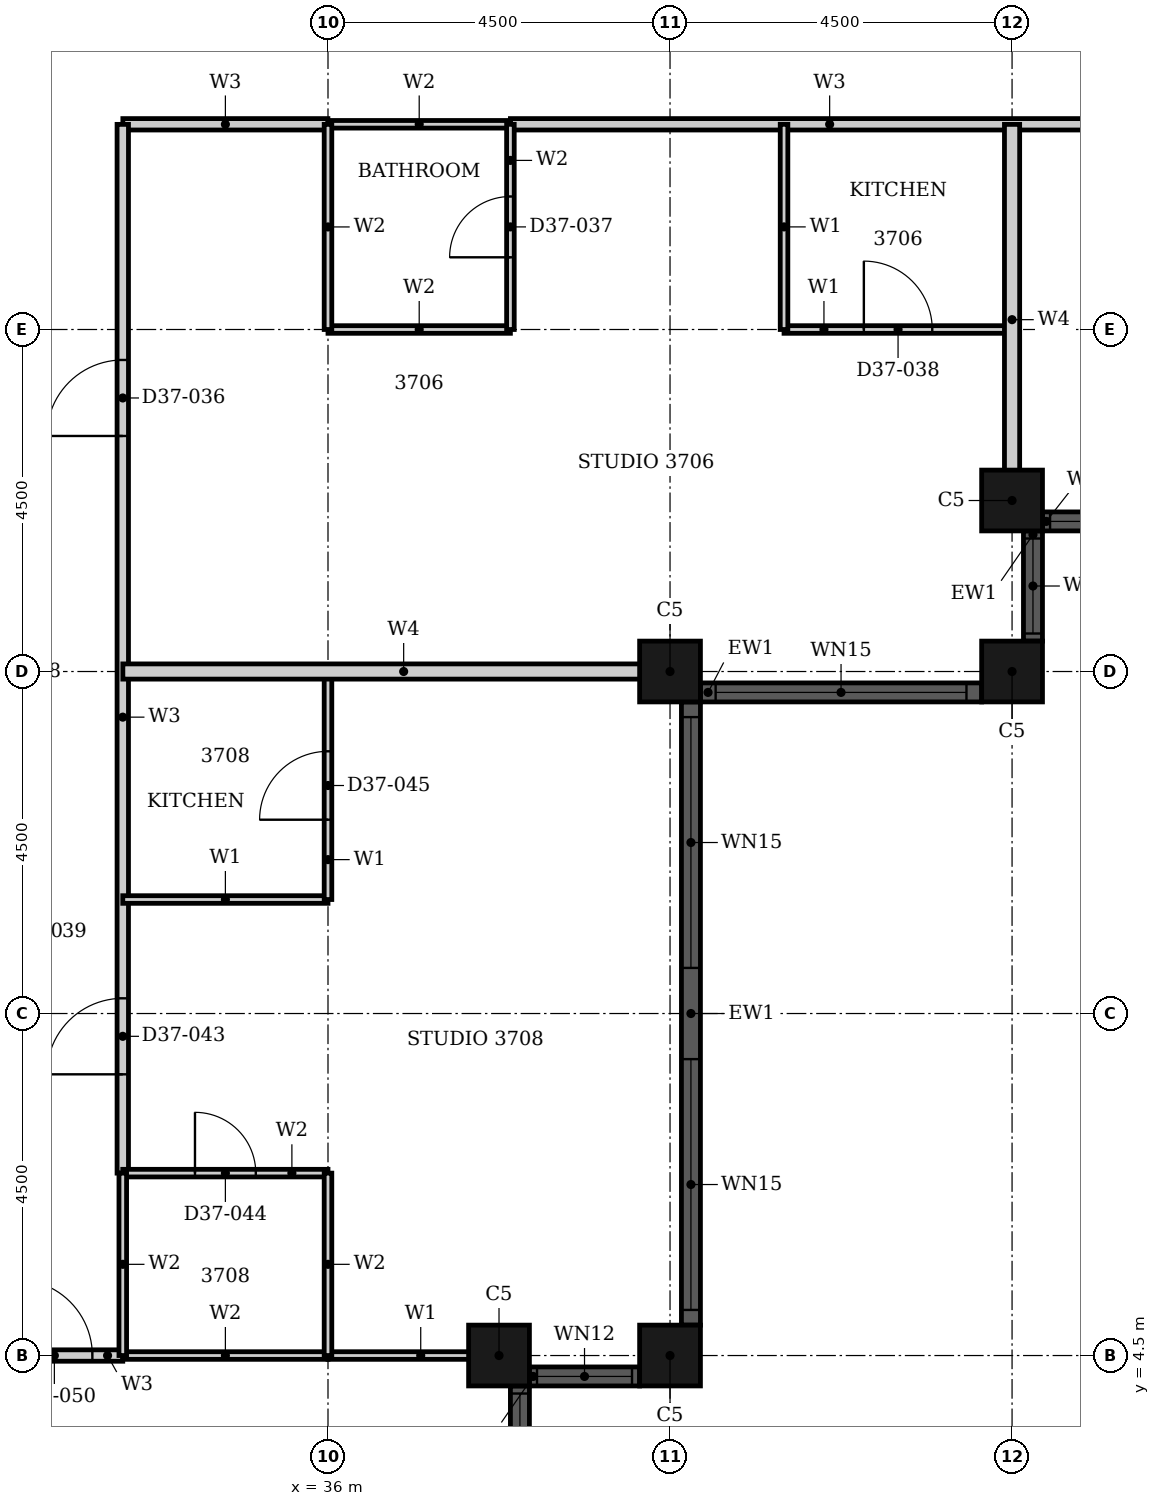
"""IFC4 building model, lengths in metres.
Left out: names, types, materials, properties, quantities, classifications, styles, units other than length and angle.
Written with IfcOpenShell. Run it as: python <this file> out.ifc"""

import sys

from ifc_helpers import new_model, si_unit, direction, frame, frame_2d, origin, origin_2d, place, context, subcontext, project, spatial, rectangle, hollow_rectangle, extrude, element, fill, save


model = new_model("IFC4")
c1 = context("Model", 3, precision=1e-05, world=origin(), true_north=direction((0.0, 1.0)))
c2 = subcontext(c1, "Body", "Model", "MODEL_VIEW")
j1 = project(units=[si_unit("LENGTHUNIT", "METRE"), si_unit("PLANEANGLEUNIT", "RADIAN")], contexts=[c1])
p1 = place(None, origin())
s1 = spatial("IfcSite", under=j1, at=p1, CompositionType="ELEMENT")
p2 = place(p1, origin())
s2 = spatial("IfcBuilding", under=s1, at=p2, CompositionType="ELEMENT")
p3 = place(p2, frame((0.0, 0.0, 150.6)))
s3 = spatial("IfcBuildingStorey", under=s2, at=p3, CompositionType="ELEMENT", Elevation=150.6)
for number, where, z_axis, x_axis in (
    (1, (38.25, 4.5, 0.0), (0.0, 0.0, 1.0), (1.0, 0.0, 0.0)),
    (2, (40.5, 4.5, 0.0), (0.0, 0.0, 1.0), (1.0, 0.0, 0.0)),
    (3, (40.5, 13.5, 0.0), (0.0, 0.0, 1.0), (1.0, 0.0, 0.0)),
    (4, (45.0, 13.5, 0.0), (0.0, 0.0, 1.0), (1.0, 0.0, 0.0)),
    (5, (45.0, 15.75, 0.0), (0.0, 0.0, 1.0), (1.0, 0.0, 0.0)),
):
    element("IfcColumn", number, at=place(p3, frame(where, z_axis=z_axis, x_axis=x_axis)), inside=s3, PredefinedType="COLUMN", context=c2, shape_type="SweptSolid", body=[
        extrude(hollow_rectangle(XDim=0.8, YDim=0.8, WallThickness=0.025, at=origin_2d()), origin(), (0.0, 0.0, 1.0), 3.7),
    ])
p4 = place(p3, frame((38.525, 2.65, 0.0), z_axis=(0.0, 0.0, 1.0), x_axis=(0.0, 1.0, 0.0)))
e6 = element("IfcWall", 6, at=p4, inside=s3, PredefinedType="SOLIDWALL", context=c2, shape_type="SweptSolid", body=[
    extrude(rectangle(XDim=1.45, YDim=0.25, at=frame_2d((0.725, 0.0))), origin(), (0.0, 0.0, 1.0), 3.7),
])
p5 = place(p4, frame((0.1, 0.0, 0.9)))
e7 = element("IfcOpeningElement", 7, at=p5, cuts=e6, PredefinedType="OPENING", context=c2, shape_type="SweptSolid", body=[
    extrude(rectangle(XDim=1.25, YDim=1.85, at=frame_2d((0.625, 0.925))), frame((0.0, 0.135, 0.0), z_axis=(0.0, -1.0, 0.0), x_axis=(1.0, 0.0, 0.0)), (0.0, 0.0, 1.0), 0.27),
])
p6 = place(p3, frame((38.65, 4.225, 0.0), z_axis=(0.0, 0.0, 1.0), x_axis=(1.0, 0.0, 0.0)))
e8 = element("IfcWall", 8, at=p6, inside=s3, PredefinedType="SOLIDWALL", context=c2, shape_type="SweptSolid", body=[
    extrude(rectangle(XDim=1.45, YDim=0.25, at=frame_2d((0.725, 0.0))), origin(), (0.0, 0.0, 1.0), 3.7),
])
p7 = place(p6, frame((0.1, 0.0, 0.9)))
e9 = element("IfcOpeningElement", 9, at=p7, cuts=e8, PredefinedType="OPENING", context=c2, shape_type="SweptSolid", body=[
    extrude(rectangle(XDim=1.25, YDim=2.08, at=frame_2d((0.625, 1.04))), frame((0.0, 0.135, 0.0), z_axis=(0.0, -1.0, 0.0), x_axis=(1.0, 0.0, 0.0)), (0.0, 0.0, 1.0), 0.27),
])
p8 = place(p3, frame((40.775, 4.9, 0.0), z_axis=(0.0, 0.0, 1.0), x_axis=(0.0, 1.0, 0.0)))
e10 = element("IfcWall", 10, at=p8, inside=s3, PredefinedType="SOLIDWALL", context=c2, shape_type="SweptSolid", body=[
    extrude(rectangle(XDim=8.2, YDim=0.25, at=frame_2d((4.1, 0.0))), origin(), (0.0, 0.0, 1.0), 3.7),
])
p9 = place(p8, frame((0.2, 0.0, 0.45)))
e11 = element("IfcOpeningElement", 11, at=p9, cuts=e10, PredefinedType="OPENING", context=c2, shape_type="SweptSolid", body=[
    extrude(rectangle(XDim=3.3, YDim=2.3, at=frame_2d((1.65, 1.15))), frame((0.0, 0.135, 0.0), z_axis=(0.0, -1.0, 0.0), x_axis=(1.0, 0.0, 0.0)), (0.0, 0.0, 1.0), 0.27),
])
p10 = place(p8, frame((4.7, 0.0, 0.45)))
e12 = element("IfcOpeningElement", 12, at=p10, cuts=e10, PredefinedType="OPENING", context=c2, shape_type="SweptSolid", body=[
    extrude(rectangle(XDim=3.3, YDim=2.3, at=frame_2d((1.65, 1.15))), frame((0.0, 0.135, 0.0), z_axis=(0.0, -1.0, 0.0), x_axis=(1.0, 0.0, 0.0)), (0.0, 0.0, 1.0), 0.27),
])
p11 = place(p3, frame((40.9, 13.225, 0.0), z_axis=(0.0, 0.0, 1.0), x_axis=(1.0, 0.0, 0.0)))
e13 = element("IfcWall", 13, at=p11, inside=s3, PredefinedType="SOLIDWALL", context=c2, shape_type="SweptSolid", body=[
    extrude(rectangle(XDim=3.7, YDim=0.25, at=frame_2d((1.85, 0.0))), origin(), (0.0, 0.0, 1.0), 3.7),
])
p12 = place(p11, frame((0.2, 0.0, 0.45)))
e14 = element("IfcOpeningElement", 14, at=p12, cuts=e13, PredefinedType="OPENING", context=c2, shape_type="SweptSolid", body=[
    extrude(rectangle(XDim=3.3, YDim=2.3, at=frame_2d((1.65, 1.15))), frame((0.0, 0.135, 0.0), z_axis=(0.0, -1.0, 0.0), x_axis=(1.0, 0.0, 0.0)), (0.0, 0.0, 1.0), 0.27),
])
p13 = place(p3, frame((45.275, 13.9, 0.0), z_axis=(0.0, 0.0, 1.0), x_axis=(0.0, 1.0, 0.0)))
e15 = element("IfcWall", 15, at=p13, inside=s3, PredefinedType="SOLIDWALL", context=c2, shape_type="SweptSolid", body=[
    extrude(rectangle(XDim=1.45, YDim=0.25, at=frame_2d((0.725, 0.0))), origin(), (0.0, 0.0, 1.0), 3.7),
])
p14 = place(p13, frame((0.1, 0.0, 0.9)))
e16 = element("IfcOpeningElement", 16, at=p14, cuts=e15, PredefinedType="OPENING", context=c2, shape_type="SweptSolid", body=[
    extrude(rectangle(XDim=1.25, YDim=1.85, at=frame_2d((0.625, 0.925))), frame((0.0, 0.135, 0.0), z_axis=(0.0, -1.0, 0.0), x_axis=(1.0, 0.0, 0.0)), (0.0, 0.0, 1.0), 0.27),
])
p15 = place(p3, frame((45.4, 15.475, 0.0), z_axis=(0.0, 0.0, 1.0), x_axis=(1.0, 0.0, 0.0)))
e17 = element("IfcWall", 17, at=p15, inside=s3, PredefinedType="SOLIDWALL", context=c2, shape_type="SweptSolid", body=[
    extrude(rectangle(XDim=1.45, YDim=0.25, at=frame_2d((0.725, 0.0))), origin(), (0.0, 0.0, 1.0), 3.7),
])
p16 = place(p15, frame((0.1, 0.0, 0.9)))
e18 = element("IfcOpeningElement", 18, at=p16, cuts=e17, PredefinedType="OPENING", context=c2, shape_type="SweptSolid", body=[
    extrude(rectangle(XDim=1.25, YDim=1.85, at=frame_2d((0.625, 0.925))), frame((0.0, 0.135, 0.0), z_axis=(0.0, -1.0, 0.0), x_axis=(1.0, 0.0, 0.0)), (0.0, 0.0, 1.0), 0.27),
])
p17 = place(p3, frame((33.301, 20.7, 0.0), z_axis=(0.0, 0.0, 1.0), x_axis=(1.0, 0.0, 0.0)))
e19 = element("IfcWall", 19, at=p17, inside=s3, PredefinedType="PARTITIONING", context=c2, shape_type="SweptSolid", body=[
    extrude(rectangle(XDim=2.698, YDim=0.15, at=frame_2d((1.349, 0.0))), origin(), (0.0, 0.0, 1.0), 3.4),
])
p18 = place(p3, frame((38.4, 20.7, 0.0), z_axis=(0.0, 0.0, 1.0), x_axis=(1.0, 0.0, 0.0)))
e20 = element("IfcWall", 20, at=p18, inside=s3, PredefinedType="PARTITIONING", context=c2, shape_type="SweptSolid", body=[
    extrude(rectangle(XDim=8.4, YDim=0.15, at=frame_2d((4.2, 0.0))), origin(), (0.0, 0.0, 1.0), 3.4),
])
p19 = place(p3, frame((31.5, 4.5, 0.0), z_axis=(0.0, 0.0, 1.0), x_axis=(1.0, 0.0, 0.0)))
e21 = element("IfcWall", 21, at=p19, inside=s3, PredefinedType="PARTITIONING", context=c2, shape_type="SweptSolid", body=[
    extrude(rectangle(XDim=1.8, YDim=0.15, at=frame_2d((0.9, 0.0))), origin(), (0.0, 0.0, 1.0), 3.4),
])
p20 = place(p19, frame((0.4, 0.0, 0.0)))
e22 = element("IfcOpeningElement", 22, at=p20, cuts=e21, PredefinedType="OPENING", context=c2, shape_type="SweptSolid", body=[
    extrude(rectangle(XDim=1.0, YDim=2.1, at=frame_2d((0.5, 1.05))), frame((0.0, 0.085, 0.0), z_axis=(0.0, -1.0, 0.0), x_axis=(1.0, 0.0, 0.0)), (0.0, 0.0, 1.0), 0.17),
])
p21 = place(p3, frame((33.3, 6.9, 0.0), z_axis=(0.0, 0.0, 1.0), x_axis=(0.0, 1.0, 0.0)))
e23 = element("IfcWall", 23, at=p21, inside=s3, PredefinedType="PARTITIONING", context=c2, shape_type="SweptSolid", body=[
    extrude(rectangle(XDim=13.799, YDim=0.15, at=frame_2d((6.899, 0.0))), origin(), (0.0, 0.0, 1.0), 3.4),
])
p22 = place(p21, frame((9.699, 0.0, 0.0)))
e24 = element("IfcOpeningElement", 24, at=p22, cuts=e23, PredefinedType="OPENING", context=c2, shape_type="SweptSolid", body=[
    extrude(rectangle(XDim=1.0, YDim=2.2, at=frame_2d((0.5, 1.1))), frame((0.0, 0.085, 0.0), z_axis=(0.0, -1.0, 0.0), x_axis=(1.0, 0.0, 0.0)), (0.0, 0.0, 1.0), 0.17),
])
p23 = place(p21, frame((1.3, 0.0, 0.0)))
e25 = element("IfcOpeningElement", 25, at=p23, cuts=e23, PredefinedType="OPENING", context=c2, shape_type="SweptSolid", body=[
    extrude(rectangle(XDim=1.0, YDim=2.2, at=frame_2d((0.5, 1.1))), frame((0.0, 0.085, 0.0), z_axis=(0.0, -1.0, 0.0), x_axis=(1.0, 0.0, 0.0)), (0.0, 0.0, 1.0), 0.17),
])
p24 = place(p3, frame((33.3, 10.5, 0.0), z_axis=(0.0, 0.0, 1.0), x_axis=(1.0, 0.0, 0.0)))
e26 = element("IfcWall", 26, at=p24, inside=s3, PredefinedType="PARTITIONING", context=c2, shape_type="SweptSolid", body=[
    extrude(rectangle(XDim=2.7, YDim=0.1, at=frame_2d((1.35, 0.0))), origin(), (0.0, 0.0, 1.0), 3.4),
])
p25 = place(p3, frame((42.0, 18.0, 0.0), z_axis=(0.0, 0.0, 1.0), x_axis=(1.0, 0.0, 0.0)))
e27 = element("IfcWall", 27, at=p25, inside=s3, PredefinedType="PARTITIONING", context=c2, shape_type="SweptSolid", body=[
    extrude(rectangle(XDim=3.0, YDim=0.1, at=frame_2d((1.5, 0.0))), origin(), (0.0, 0.0, 1.0), 3.4),
])
p26 = place(p25, frame((1.05, 0.0, 0.0)))
e28 = element("IfcOpeningElement", 28, at=p26, cuts=e27, PredefinedType="OPENING", context=c2, shape_type="SweptSolid", body=[
    extrude(rectangle(XDim=0.9, YDim=2.1, at=frame_2d((0.45, 1.05))), frame((0.0, 0.06, 0.0), z_axis=(0.0, -1.0, 0.0), x_axis=(1.0, 0.0, 0.0)), (0.0, 0.0, 1.0), 0.12),
])
p27 = place(p3, frame((36.0, 4.5, 0.0), z_axis=(0.0, 0.0, 1.0), x_axis=(1.0, 0.0, 0.0)))
e29 = element("IfcWall", 29, at=p27, inside=s3, PredefinedType="PARTITIONING", context=c2, shape_type="SweptSolid", body=[
    extrude(rectangle(XDim=2.44, YDim=0.1, at=frame_2d((1.22, 0.0))), origin(), (0.0, 0.0, 1.0), 3.4),
])
p28 = place(p3, frame((36.0, 10.5, 0.0), z_axis=(0.0, 0.0, 1.0), x_axis=(0.0, 1.0, 0.0)))
e30 = element("IfcWall", 30, at=p28, inside=s3, PredefinedType="PARTITIONING", context=c2, shape_type="SweptSolid", body=[
    extrude(rectangle(XDim=3.0, YDim=0.1, at=frame_2d((1.5, 0.0))), origin(), (0.0, 0.0, 1.0), 2.68),
])
p29 = place(p28, frame((1.05, 0.0, 0.0)))
e31 = element("IfcOpeningElement", 31, at=p29, cuts=e30, PredefinedType="OPENING", context=c2, shape_type="SweptSolid", body=[
    extrude(rectangle(XDim=0.9, YDim=2.1, at=frame_2d((0.45, 1.05))), frame((0.0, 0.06, 0.0), z_axis=(0.0, -1.0, 0.0), x_axis=(1.0, 0.0, 0.0)), (0.0, 0.0, 1.0), 0.12),
])
p30 = place(p3, frame((42.0, 18.0, 0.0), z_axis=(0.0, 0.0, 1.0), x_axis=(0.0, 1.0, 0.0)))
e32 = element("IfcWall", 32, at=p30, inside=s3, PredefinedType="PARTITIONING", context=c2, shape_type="SweptSolid", body=[
    extrude(rectangle(XDim=2.7, YDim=0.1, at=frame_2d((1.35, 0.0))), origin(), (0.0, 0.0, 1.0), 3.4),
])
p31 = place(p3, frame((33.301, 13.5, 0.0), z_axis=(0.0, 0.0, 1.0), x_axis=(1.0, 0.0, 0.0)))
e33 = element("IfcWall", 33, at=p31, inside=s3, PredefinedType="PARTITIONING", context=c2, shape_type="SweptSolid", body=[
    extrude(rectangle(XDim=7.389, YDim=0.2, at=frame_2d((3.694, 0.0))), origin(), (0.0, 0.0, 1.0), 2.48),
])
p32 = place(p3, frame((45.0, 15.56, 0.0), z_axis=(0.0, 0.0, 1.0), x_axis=(0.0, 1.0, 0.0)))
e34 = element("IfcWall", 34, at=p32, inside=s3, PredefinedType="PARTITIONING", context=c2, shape_type="SweptSolid", body=[
    extrude(rectangle(XDim=5.139, YDim=0.2, at=frame_2d((2.569, 0.0))), origin(), (0.0, 0.0, 1.0), 3.4),
])
for number, where, z_axis, x_axis in (
    (35, (36.0, 18.0, 0.0), (0.0, 0.0, 1.0), (1.0, 0.0, 0.0)),
    (36, (36.0, 20.7, 0.0), (0.0, 0.0, 1.0), (1.0, 0.0, 0.0)),
):
    element("IfcWall", number, at=place(p3, frame(where, z_axis=z_axis, x_axis=x_axis)), inside=s3, PredefinedType="PARTITIONING", context=c2, shape_type="SweptSolid", body=[
        extrude(rectangle(XDim=2.4, YDim=0.1, at=frame_2d((1.2, 0.0))), origin(), (0.0, 0.0, 1.0), 3.4),
    ])
p33 = place(p3, frame((33.3, 4.5, 0.0), z_axis=(0.0, 0.0, 1.0), x_axis=(1.0, 0.0, 0.0)))
e37 = element("IfcWall", 37, at=p33, inside=s3, PredefinedType="PARTITIONING", context=c2, shape_type="SweptSolid", body=[
    extrude(rectangle(XDim=2.7, YDim=0.1, at=frame_2d((1.35, 0.0))), origin(), (0.0, 0.0, 1.0), 3.4),
])
p34 = place(p3, frame((33.3, 6.9, 0.0), z_axis=(0.0, 0.0, 1.0), x_axis=(1.0, 0.0, 0.0)))
e38 = element("IfcWall", 38, at=p34, inside=s3, PredefinedType="PARTITIONING", context=c2, shape_type="SweptSolid", body=[
    extrude(rectangle(XDim=2.7, YDim=0.1, at=frame_2d((1.35, 0.0))), origin(), (0.0, 0.0, 1.0), 3.4),
])
p35 = place(p34, frame((0.95, 0.0, 0.0)))
e39 = element("IfcOpeningElement", 39, at=p35, cuts=e38, PredefinedType="OPENING", context=c2, shape_type="SweptSolid", body=[
    extrude(rectangle(XDim=0.8, YDim=2.1, at=frame_2d((0.4, 1.05))), frame((0.0, 0.06, 0.0), z_axis=(0.0, -1.0, 0.0), x_axis=(1.0, 0.0, 0.0)), (0.0, 0.0, 1.0), 0.12),
])
p36 = place(p3, frame((33.3, 4.5, 0.0), z_axis=(0.0, 0.0, 1.0), x_axis=(0.0, 1.0, 0.0)))
e40 = element("IfcWall", 40, at=p36, inside=s3, PredefinedType="PARTITIONING", context=c2, shape_type="SweptSolid", body=[
    extrude(rectangle(XDim=2.4, YDim=0.1, at=frame_2d((1.2, 0.0))), origin(), (0.0, 0.0, 1.0), 3.4),
])
p37 = place(p3, frame((36.0, 4.5, 0.0), z_axis=(0.0, 0.0, 1.0), x_axis=(0.0, 1.0, 0.0)))
e41 = element("IfcWall", 41, at=p37, inside=s3, PredefinedType="PARTITIONING", context=c2, shape_type="SweptSolid", body=[
    extrude(rectangle(XDim=2.4, YDim=0.1, at=frame_2d((1.2, 0.0))), origin(), (0.0, 0.0, 1.0), 2.68),
])
p38 = place(p3, frame((36.0, 18.0, 0.0), z_axis=(0.0, 0.0, 1.0), x_axis=(0.0, 1.0, 0.0)))
e42 = element("IfcWall", 42, at=p38, inside=s3, PredefinedType="PARTITIONING", context=c2, shape_type="SweptSolid", body=[
    extrude(rectangle(XDim=2.699, YDim=0.1, at=frame_2d((1.35, 0.0))), origin(), (0.0, 0.0, 1.0), 3.4),
])
p39 = place(p3, frame((38.4, 18.0, 0.0), z_axis=(0.0, 0.0, 1.0), x_axis=(0.0, 1.0, 0.0)))
e43 = element("IfcWall", 43, at=p39, inside=s3, PredefinedType="PARTITIONING", context=c2, shape_type="SweptSolid", body=[
    extrude(rectangle(XDim=2.7, YDim=0.1, at=frame_2d((1.35, 0.0))), origin(), (0.0, 0.0, 1.0), 3.4),
])
p40 = place(p39, frame((0.95, 0.0, 0.0)))
e44 = element("IfcOpeningElement", 44, at=p40, cuts=e43, PredefinedType="OPENING", context=c2, shape_type="SweptSolid", body=[
    extrude(rectangle(XDim=0.8, YDim=2.1, at=frame_2d((0.4, 1.05))), frame((0.0, 0.06, 0.0), z_axis=(0.0, -1.0, 0.0), x_axis=(1.0, 0.0, 0.0)), (0.0, 0.0, 1.0), 0.12),
])
p41 = place(p5, origin())
e45 = element("IfcWindow", 45, at=p41, inside=s3, PartitioningType="SINGLE_PANEL", PredefinedType="WINDOW", context=c2, shape_type="SweptSolid", body=[
    extrude(rectangle(XDim=1.25, YDim=1.85, at=frame_2d((0.625, 0.925))), frame((0.0, 0.03, 0.0), z_axis=(0.0, -1.0, 0.0), x_axis=(1.0, 0.0, 0.0)), (0.0, 0.0, 1.0), 0.06),
])
fill(e7, e45)
p42 = place(p7, origin())
e46 = element("IfcWindow", 46, at=p42, inside=s3, PartitioningType="SINGLE_PANEL", PredefinedType="WINDOW", context=c2, shape_type="SweptSolid", body=[
    extrude(rectangle(XDim=1.25, YDim=2.08, at=frame_2d((0.625, 1.04))), frame((0.0, 0.03, 0.0), z_axis=(0.0, -1.0, 0.0), x_axis=(1.0, 0.0, 0.0)), (0.0, 0.0, 1.0), 0.06),
])
fill(e9, e46)
p43 = place(p9, origin())
e47 = element("IfcWindow", 47, at=p43, inside=s3, PartitioningType="SINGLE_PANEL", PredefinedType="WINDOW", context=c2, shape_type="SweptSolid", body=[
    extrude(rectangle(XDim=3.3, YDim=2.3, at=frame_2d((1.65, 1.15))), frame((0.0, 0.03, 0.0), z_axis=(0.0, -1.0, 0.0), x_axis=(1.0, 0.0, 0.0)), (0.0, 0.0, 1.0), 0.06),
])
fill(e11, e47)
p44 = place(p10, origin())
e48 = element("IfcWindow", 48, at=p44, inside=s3, PartitioningType="SINGLE_PANEL", PredefinedType="WINDOW", context=c2, shape_type="SweptSolid", body=[
    extrude(rectangle(XDim=3.3, YDim=2.3, at=frame_2d((1.65, 1.15))), frame((0.0, 0.03, 0.0), z_axis=(0.0, -1.0, 0.0), x_axis=(1.0, 0.0, 0.0)), (0.0, 0.0, 1.0), 0.06),
])
fill(e12, e48)
p45 = place(p12, origin())
e49 = element("IfcWindow", 49, at=p45, inside=s3, PartitioningType="SINGLE_PANEL", PredefinedType="WINDOW", context=c2, shape_type="SweptSolid", body=[
    extrude(rectangle(XDim=3.3, YDim=2.3, at=frame_2d((1.65, 1.15))), frame((0.0, 0.03, 0.0), z_axis=(0.0, -1.0, 0.0), x_axis=(1.0, 0.0, 0.0)), (0.0, 0.0, 1.0), 0.06),
])
fill(e14, e49)
p46 = place(p14, origin())
e50 = element("IfcWindow", 50, at=p46, inside=s3, PartitioningType="SINGLE_PANEL", PredefinedType="WINDOW", context=c2, shape_type="SweptSolid", body=[
    extrude(rectangle(XDim=1.25, YDim=1.85, at=frame_2d((0.625, 0.925))), frame((0.0, 0.03, 0.0), z_axis=(0.0, -1.0, 0.0), x_axis=(1.0, 0.0, 0.0)), (0.0, 0.0, 1.0), 0.06),
])
fill(e16, e50)
p47 = place(p16, origin())
e51 = element("IfcWindow", 51, at=p47, inside=s3, PartitioningType="SINGLE_PANEL", PredefinedType="WINDOW", context=c2, shape_type="SweptSolid", body=[
    extrude(rectangle(XDim=1.25, YDim=1.85, at=frame_2d((0.625, 0.925))), frame((0.0, 0.03, 0.0), z_axis=(0.0, -1.0, 0.0), x_axis=(1.0, 0.0, 0.0)), (0.0, 0.0, 1.0), 0.06),
])
fill(e18, e51)
p48 = place(p22, origin())
e52 = element("IfcDoor", 52, at=p48, inside=s3, OperationType="SINGLE_SWING_RIGHT", PredefinedType="DOOR", context=c2, shape_type="SweptSolid", body=[
    extrude(rectangle(XDim=1.0, YDim=2.2, at=frame_2d((0.5, 1.1))), frame((0.0, 0.025, 0.0), z_axis=(0.0, -1.0, 0.0), x_axis=(1.0, 0.0, 0.0)), (0.0, 0.0, 1.0), 0.05),
])
fill(e24, e52)
p49 = place(p40, origin())
e53 = element("IfcDoor", 53, at=p49, inside=s3, OperationType="SINGLE_SWING_RIGHT", PredefinedType="DOOR", context=c2, shape_type="SweptSolid", body=[
    extrude(rectangle(XDim=0.8, YDim=2.1, at=frame_2d((0.4, 1.05))), frame((0.0, 0.025, 0.0), z_axis=(0.0, -1.0, 0.0), x_axis=(1.0, 0.0, 0.0)), (0.0, 0.0, 1.0), 0.05),
])
fill(e44, e53)
p50 = place(p26, origin())
e54 = element("IfcDoor", 54, at=p50, inside=s3, OperationType="SINGLE_SWING_RIGHT", PredefinedType="DOOR", context=c2, shape_type="SweptSolid", body=[
    extrude(rectangle(XDim=0.9, YDim=2.1, at=frame_2d((0.45, 1.05))), frame((0.0, 0.025, 0.0), z_axis=(0.0, -1.0, 0.0), x_axis=(1.0, 0.0, 0.0)), (0.0, 0.0, 1.0), 0.05),
])
fill(e28, e54)
p51 = place(p23, origin())
e55 = element("IfcDoor", 55, at=p51, inside=s3, OperationType="SINGLE_SWING_LEFT", PredefinedType="DOOR", context=c2, shape_type="SweptSolid", body=[
    extrude(rectangle(XDim=1.0, YDim=2.2, at=frame_2d((0.5, 1.1))), frame((0.0, 0.025, 0.0), z_axis=(0.0, -1.0, 0.0), x_axis=(1.0, 0.0, 0.0)), (0.0, 0.0, 1.0), 0.05),
])
fill(e25, e55)
p52 = place(p35, origin())
e56 = element("IfcDoor", 56, at=p52, inside=s3, OperationType="SINGLE_SWING_LEFT", PredefinedType="DOOR", context=c2, shape_type="SweptSolid", body=[
    extrude(rectangle(XDim=0.8, YDim=2.1, at=frame_2d((0.4, 1.05))), frame((0.0, 0.025, 0.0), z_axis=(0.0, -1.0, 0.0), x_axis=(1.0, 0.0, 0.0)), (0.0, 0.0, 1.0), 0.05),
])
fill(e39, e56)
p53 = place(p29, origin())
e57 = element("IfcDoor", 57, at=p53, inside=s3, OperationType="SINGLE_SWING_RIGHT", PredefinedType="DOOR", context=c2, shape_type="SweptSolid", body=[
    extrude(rectangle(XDim=0.9, YDim=2.1, at=frame_2d((0.45, 1.05))), frame((0.0, 0.025, 0.0), z_axis=(0.0, -1.0, 0.0), x_axis=(1.0, 0.0, 0.0)), (0.0, 0.0, 1.0), 0.05),
])
fill(e31, e57)
p54 = place(p20, origin())
e58 = element("IfcDoor", 58, at=p54, inside=s3, OperationType="SINGLE_SWING_LEFT", PredefinedType="DOOR", context=c2, shape_type="SweptSolid", body=[
    extrude(rectangle(XDim=1.0, YDim=2.1, at=frame_2d((0.5, 1.05))), frame((0.0, 0.025, 0.0), z_axis=(0.0, -1.0, 0.0), x_axis=(1.0, 0.0, 0.0)), (0.0, 0.0, 1.0), 0.05),
])
fill(e22, e58)
save(model, sys.argv[1])
